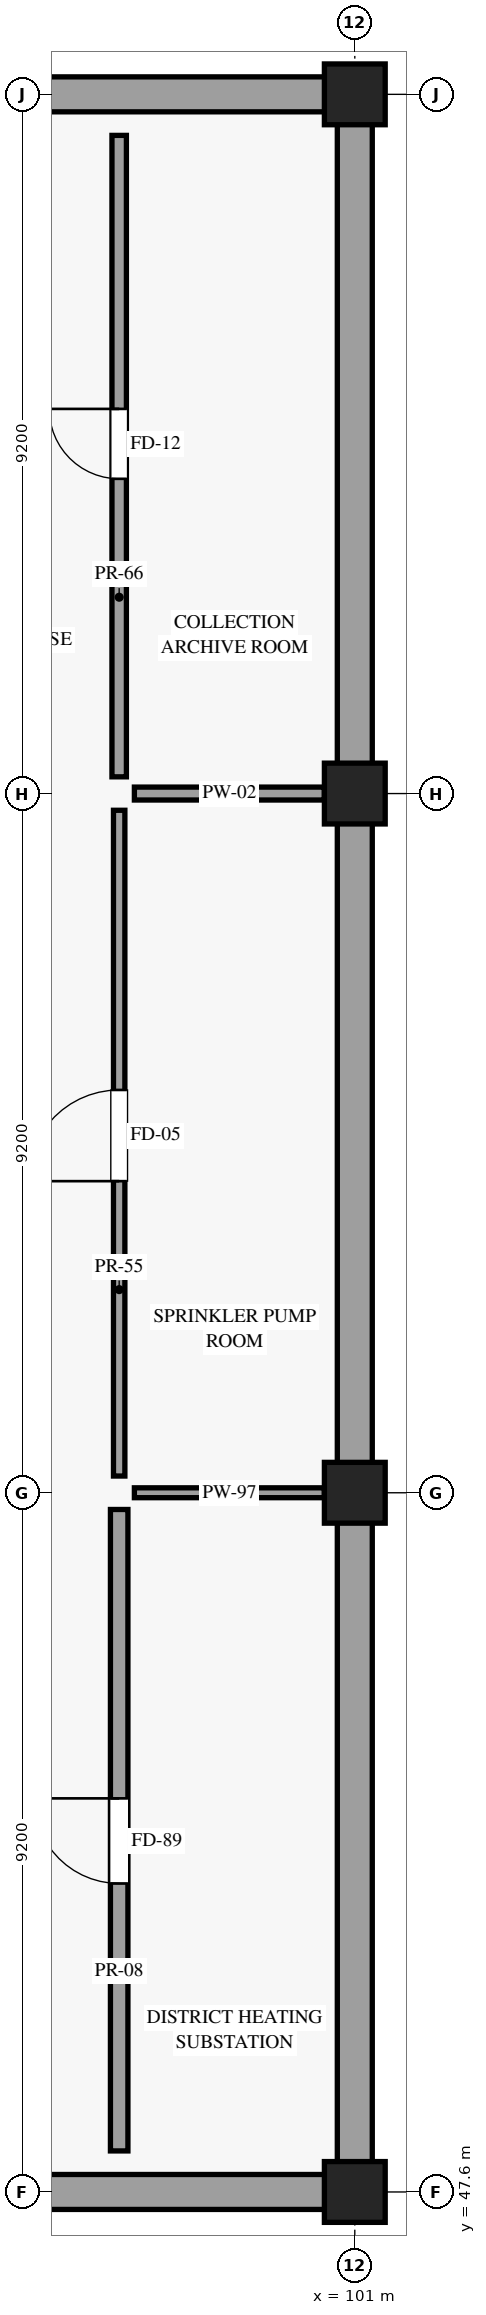
"""IFC4 building model, lengths in metres.
Left out: names, types, materials, properties, quantities, classifications, styles, units other than length and angle.
Written with IfcOpenShell. Run it as: python <this file> out.ifc"""

import sys

from ifc_helpers import new_model, si_unit, direction, frame, frame_2d, origin, origin_2d, place, context, subcontext, project, spatial, rectangle, extrude, element, fill, save


model = new_model("IFC4")
c1 = context("Model", 3, precision=1e-05, world=origin(), true_north=direction((0.0, 1.0)))
c2 = subcontext(c1, "Body", "Model", "MODEL_VIEW")
j1 = project(units=[si_unit("LENGTHUNIT", "METRE"), si_unit("PLANEANGLEUNIT", "RADIAN")], contexts=[c1])
p1 = place(None, origin())
s1 = spatial("IfcSite", under=j1, at=p1, CompositionType="ELEMENT")
p2 = place(p1, origin())
s2 = spatial("IfcBuilding", under=s1, at=p2, CompositionType="ELEMENT")
p3 = place(p2, frame((0.0, 0.0, -4.8)))
s3 = spatial("IfcBuildingStorey", under=s2, at=p3, CompositionType="ELEMENT", Elevation=-4.8)
for number, where, z_axis, x_axis in (
    (1, (101.0, 47.6, 0.0), (0.0, 0.0, 1.0), (1.0, 0.0, 0.0)),
    (2, (101.0, 56.8, 0.0), (0.0, 0.0, 1.0), (1.0, 0.0, 0.0)),
    (3, (101.0, 66.0, 0.0), (0.0, 0.0, 1.0), (1.0, 0.0, 0.0)),
    (4, (101.0, 75.2, 0.0), (0.0, 0.0, 1.0), (1.0, 0.0, 0.0)),
):
    element("IfcColumn", number, at=place(p3, frame(where, z_axis=z_axis, x_axis=x_axis)), inside=s3, PredefinedType="COLUMN", context=c2, shape_type="SweptSolid", body=[
        extrude(rectangle(XDim=0.8, YDim=0.8, at=origin_2d()), origin(), (0.0, 0.0, 1.0), 4.8),
    ])
p4 = place(p3, frame((73.77, 47.6, 0.0), z_axis=(0.0, 0.0, 1.0), x_axis=(1.0, 0.0, 0.0)))
e5 = element("IfcWall", 5, at=p4, inside=s3, PredefinedType="SOLIDWALL", context=c2, shape_type="SweptSolid", body=[
    extrude(rectangle(XDim=27.46, YDim=0.46, at=frame_2d((13.73, 0.0))), origin(), (0.0, 0.0, 1.0), 3.515),
])
p5 = place(p3, frame((73.77, 75.2, 0.0), z_axis=(0.0, 0.0, 1.0), x_axis=(1.0, 0.0, 0.0)))
e6 = element("IfcWall", 6, at=p5, inside=s3, PredefinedType="SOLIDWALL", context=c2, shape_type="SweptSolid", body=[
    extrude(rectangle(XDim=27.46, YDim=0.46, at=frame_2d((13.73, 0.0))), origin(), (0.0, 0.0, 1.0), 3.215),
])
p6 = place(p3, frame((101.0, 47.6, 0.0), z_axis=(0.0, 0.0, 1.0), x_axis=(0.0, 1.0, 0.0)))
e7 = element("IfcWall", 7, at=p6, inside=s3, PredefinedType="SOLIDWALL", context=c2, shape_type="SweptSolid", body=[
    extrude(rectangle(XDim=27.6, YDim=0.46, at=frame_2d((13.8, 0.0))), origin(), (0.0, 0.0, 1.0), 3.515),
])
p7 = place(p3, frame((97.9, 48.14, 0.0), z_axis=(0.0, 0.0, 1.0), x_axis=(0.0, 1.0, 0.0)))
e8 = element("IfcWall", 8, at=p7, inside=s3, PredefinedType="PARTITIONING", context=c2, shape_type="SweptSolid", body=[
    extrude(rectangle(XDim=8.44, YDim=0.23, at=frame_2d((4.22, 0.0))), origin(), (0.0, 0.0, 1.0), 3.515),
])
p8 = place(p7, frame((3.519, 0.0, 0.0)))
e9 = element("IfcOpeningElement", 9, at=p8, cuts=e8, PredefinedType="OPENING", context=c2, shape_type="SweptSolid", body=[
    extrude(rectangle(XDim=1.12, YDim=2.26, at=frame_2d((0.56, 1.13))), frame((0.0, 0.125, 0.0), z_axis=(0.0, -1.0, 0.0), x_axis=(1.0, 0.0, 0.0)), (0.0, 0.0, 1.0), 0.25),
])
p9 = place(p3, frame((98.1, 56.8, 0.0), z_axis=(0.0, 0.0, 1.0), x_axis=(1.0, 0.0, 0.0)))
e10 = element("IfcWall", 10, at=p9, inside=s3, PredefinedType="PARTITIONING", context=c2, shape_type="SweptSolid", body=[
    extrude(rectangle(XDim=2.5, YDim=0.13, at=frame_2d((1.25, 0.0))), origin(), (0.0, 0.0, 1.0), 3.515),
])
p10 = place(p3, frame((97.9, 57.02, 0.0), z_axis=(0.0, 0.0, 1.0), x_axis=(0.0, 1.0, 0.0)))
e11 = element("IfcWall", 11, at=p10, inside=s3, PredefinedType="PARTITIONING", context=c2, shape_type="SweptSolid", body=[
    extrude(rectangle(XDim=8.76, YDim=0.15, at=frame_2d((4.38, 0.0))), origin(), (0.0, 0.0, 1.0), 3.515),
])
p11 = place(p10, frame((3.88, 0.0, 0.0)))
e12 = element("IfcOpeningElement", 12, at=p11, cuts=e11, PredefinedType="OPENING", context=c2, shape_type="SweptSolid", body=[
    extrude(rectangle(XDim=1.2, YDim=2.3, at=frame_2d((0.6, 1.15))), frame((0.0, 0.085, 0.0), z_axis=(0.0, -1.0, 0.0), x_axis=(1.0, 0.0, 0.0)), (0.0, 0.0, 1.0), 0.17),
])
p12 = place(p3, frame((98.1, 66.0, 0.0), z_axis=(0.0, 0.0, 1.0), x_axis=(1.0, 0.0, 0.0)))
e13 = element("IfcWall", 13, at=p12, inside=s3, PredefinedType="PARTITIONING", context=c2, shape_type="SweptSolid", body=[
    extrude(rectangle(XDim=2.5, YDim=0.17, at=frame_2d((1.25, 0.0))), origin(), (0.0, 0.0, 1.0), 3.515),
])
p13 = place(p3, frame((97.9, 66.22, 0.0), z_axis=(0.0, 0.0, 1.0), x_axis=(0.0, 1.0, 0.0)))
e14 = element("IfcWall", 14, at=p13, inside=s3, PredefinedType="PARTITIONING", context=c2, shape_type="SweptSolid", body=[
    extrude(rectangle(XDim=8.44, YDim=0.19, at=frame_2d((4.22, 0.0))), origin(), (0.0, 0.0, 1.0), 3.515),
])
p14 = place(p13, frame((3.921, 0.0, 0.0)))
e15 = element("IfcOpeningElement", 15, at=p14, cuts=e14, PredefinedType="OPENING", context=c2, shape_type="SweptSolid", body=[
    extrude(rectangle(XDim=0.92, YDim=2.12, at=frame_2d((0.46, 1.06))), frame((0.0, 0.105, 0.0), z_axis=(0.0, -1.0, 0.0), x_axis=(1.0, 0.0, 0.0)), (0.0, 0.0, 1.0), 0.21),
])
p15 = place(p8, origin())
e16 = element("IfcDoor", 16, at=p15, inside=s3, OperationType="SINGLE_SWING_RIGHT", PredefinedType="DOOR", context=c2, shape_type="SweptSolid", body=[
    extrude(rectangle(XDim=1.12, YDim=2.26, at=frame_2d((0.56, 1.13))), frame((0.0, 0.025, 0.0), z_axis=(0.0, -1.0, 0.0), x_axis=(1.0, 0.0, 0.0)), (0.0, 0.0, 1.0), 0.05),
])
fill(e9, e16)
p16 = place(p11, origin())
e17 = element("IfcDoor", 17, at=p16, inside=s3, OperationType="SINGLE_SWING_LEFT", PredefinedType="DOOR", context=c2, shape_type="SweptSolid", body=[
    extrude(rectangle(XDim=1.2, YDim=2.3, at=frame_2d((0.6, 1.15))), frame((0.0, 0.025, 0.0), z_axis=(0.0, -1.0, 0.0), x_axis=(1.0, 0.0, 0.0)), (0.0, 0.0, 1.0), 0.05),
])
fill(e12, e17)
p17 = place(p14, origin())
e18 = element("IfcDoor", 18, at=p17, inside=s3, OperationType="SINGLE_SWING_RIGHT", PredefinedType="DOOR", context=c2, shape_type="SweptSolid", body=[
    extrude(rectangle(XDim=0.92, YDim=2.12, at=frame_2d((0.46, 1.06))), frame((0.0, 0.025, 0.0), z_axis=(0.0, -1.0, 0.0), x_axis=(1.0, 0.0, 0.0)), (0.0, 0.0, 1.0), 0.05),
])
fill(e15, e18)
save(model, sys.argv[1])
